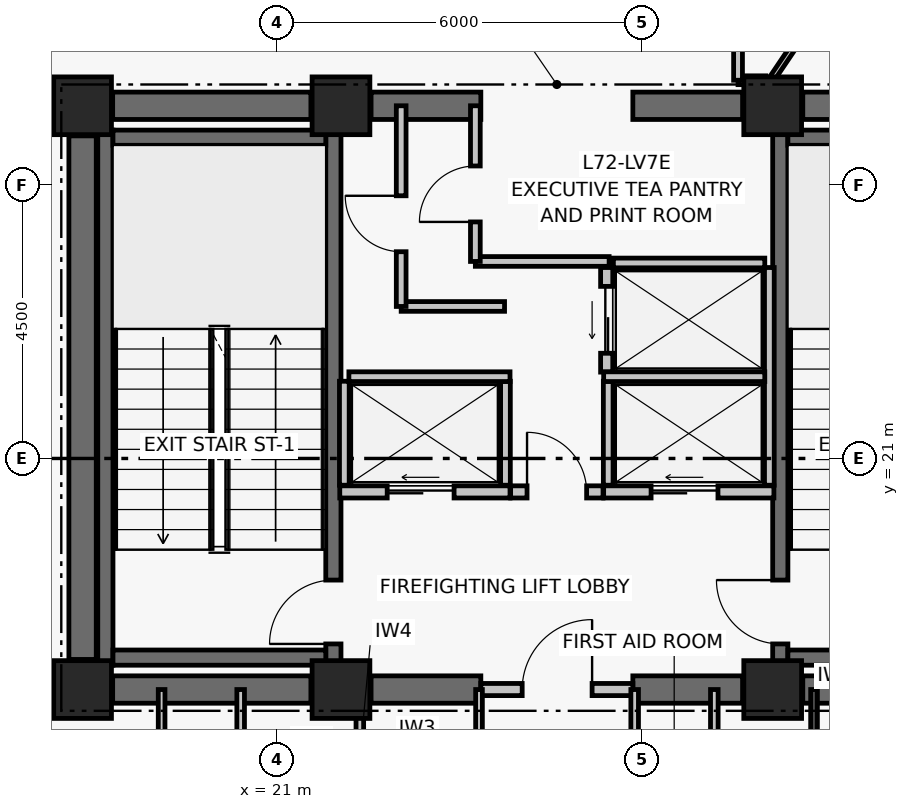
"""IFC4 building model, lengths in metres.
Left out: names, types, materials, properties, quantities, classifications, styles, units other than length and angle.
Written with IfcOpenShell. Run it as: python <this file> out.ifc"""

import sys

from ifc_helpers import new_model, si_unit, direction, frame, frame_2d, origin, origin_2d, place, context, subcontext, project, spatial, rectangle, extrude, element, fill, save


model = new_model("IFC4")
c1 = context("Model", 3, precision=1e-05, world=origin(), true_north=direction((0.0, 1.0)))
c2 = subcontext(c1, "Body", "Model", "MODEL_VIEW")
j1 = project(units=[si_unit("LENGTHUNIT", "METRE"), si_unit("PLANEANGLEUNIT", "RADIAN")], contexts=[c1])
p1 = place(None, origin())
s1 = spatial("IfcSite", under=j1, at=p1, CompositionType="ELEMENT")
p2 = place(p1, origin())
s2 = spatial("IfcBuilding", under=s1, at=p2, CompositionType="ELEMENT")
p3 = place(p2, frame((0.0, 0.0, 284.34)))
s3 = spatial("IfcBuildingStorey", under=s2, at=p3, CompositionType="ELEMENT", Elevation=284.34)
for number, where, z_axis, x_axis in (
    (1, (17.8, 17.2, 0.0), (0.0, 0.0, 1.0), (1.0, 0.0, 0.0)),
    (2, (22.05, 17.2, 0.0), (0.0, 0.0, 1.0), (1.0, 0.0, 0.0)),
    (3, (29.15, 17.2, 0.0), (0.0, 0.0, 1.0), (1.0, 0.0, 0.0)),
    (4, (17.8, 26.8, 0.0), (0.0, 0.0, 1.0), (1.0, 0.0, 0.0)),
    (5, (22.05, 26.8, 0.0), (0.0, 0.0, 1.0), (1.0, 0.0, 0.0)),
    (6, (29.15, 26.8, 0.0), (0.0, 0.0, 1.0), (1.0, 0.0, 0.0)),
):
    element("IfcColumn", number, at=place(p3, frame(where, z_axis=z_axis, x_axis=x_axis)), inside=s3, PredefinedType="COLUMN", context=c2, shape_type="SweptSolid", body=[
        extrude(rectangle(XDim=0.95, YDim=0.95, at=origin_2d()), origin(), (0.0, 0.0, 1.0), 3.72),
    ])
p4 = place(p3, frame((18.295, 17.2, 0.0), z_axis=(0.0, 0.0, 1.0), x_axis=(1.0, 0.0, 0.0)))
e7 = element("IfcWall", 7, at=p4, inside=s3, PredefinedType="SHEAR", context=c2, shape_type="SweptSolid", body=[
    extrude(rectangle(XDim=3.26, YDim=0.45, at=frame_2d((1.63, 0.0))), origin(), (0.0, 0.0, 1.0), 3.5),
])
p5 = place(p3, frame((22.545, 17.2, 0.0), z_axis=(0.0, 0.0, 1.0), x_axis=(1.0, 0.0, 0.0)))
e8 = element("IfcWall", 8, at=p5, inside=s3, PredefinedType="SHEAR", context=c2, shape_type="SweptSolid", body=[
    extrude(rectangle(XDim=1.805, YDim=0.45, at=frame_2d((0.903, 0.0))), origin(), (0.0, 0.0, 1.0), 3.5),
])
p6 = place(p3, frame((26.85, 17.2, 0.0), z_axis=(0.0, 0.0, 1.0), x_axis=(1.0, 0.0, 0.0)))
e9 = element("IfcWall", 9, at=p6, inside=s3, PredefinedType="SHEAR", context=c2, shape_type="SweptSolid", body=[
    extrude(rectangle(XDim=1.805, YDim=0.45, at=frame_2d((0.902, 0.0))), origin(), (0.0, 0.0, 1.0), 3.5),
])
for number, where, z_axis, x_axis in (
    (10, (29.645, 17.2, 0.0), (0.0, 0.0, 1.0), (1.0, 0.0, 0.0)),
    (11, (18.295, 26.8, 0.0), (0.0, 0.0, 1.0), (1.0, 0.0, 0.0)),
):
    element("IfcWall", number, at=place(p3, frame(where, z_axis=z_axis, x_axis=x_axis)), inside=s3, PredefinedType="SHEAR", context=c2, shape_type="SweptSolid", body=[
        extrude(rectangle(XDim=3.26, YDim=0.45, at=frame_2d((1.63, 0.0))), origin(), (0.0, 0.0, 1.0), 3.5),
    ])
p7 = place(p3, frame((22.545, 26.8, 0.0), z_axis=(0.0, 0.0, 1.0), x_axis=(1.0, 0.0, 0.0)))
e12 = element("IfcWall", 12, at=p7, inside=s3, PredefinedType="SHEAR", context=c2, shape_type="SweptSolid", body=[
    extrude(rectangle(XDim=1.805, YDim=0.45, at=frame_2d((0.903, 0.0))), origin(), (0.0, 0.0, 1.0), 3.5),
])
p8 = place(p3, frame((26.85, 26.8, 0.0), z_axis=(0.0, 0.0, 1.0), x_axis=(1.0, 0.0, 0.0)))
e13 = element("IfcWall", 13, at=p8, inside=s3, PredefinedType="SHEAR", context=c2, shape_type="SweptSolid", body=[
    extrude(rectangle(XDim=1.805, YDim=0.45, at=frame_2d((0.902, 0.0))), origin(), (0.0, 0.0, 1.0), 3.5),
])
p9 = place(p3, frame((29.645, 26.8, 0.0), z_axis=(0.0, 0.0, 1.0), x_axis=(1.0, 0.0, 0.0)))
e14 = element("IfcWall", 14, at=p9, inside=s3, PredefinedType="SHEAR", context=c2, shape_type="SweptSolid", body=[
    extrude(rectangle(XDim=3.26, YDim=0.45, at=frame_2d((1.63, 0.0))), origin(), (0.0, 0.0, 1.0), 3.5),
])
p10 = place(p3, frame((17.8, 17.695, 0.0), z_axis=(0.0, 0.0, 1.0), x_axis=(0.0, 1.0, 0.0)))
e15 = element("IfcWall", 15, at=p10, inside=s3, PredefinedType="SHEAR", context=c2, shape_type="SweptSolid", body=[
    extrude(rectangle(XDim=8.61, YDim=0.45, at=frame_2d((4.305, 0.0))), origin(), (0.0, 0.0, 1.0), 3.5),
])
p11 = place(p3, frame((18.175, 17.6, 0.0), z_axis=(0.0, 0.0, 1.0), x_axis=(0.0, 1.0, 0.0)))
e16 = element("IfcWall", 16, at=p11, inside=s3, PredefinedType="SHEAR", context=c2, shape_type="SweptSolid", body=[
    extrude(rectangle(XDim=8.8, YDim=0.25, at=frame_2d((4.4, 0.0))), origin(), (0.0, 0.0, 1.0), 3.5),
])
p12 = place(p3, frame((21.925, 17.6, 0.0), z_axis=(0.0, 0.0, 1.0), x_axis=(0.0, 1.0, 0.0)))
e17 = element("IfcWall", 17, at=p12, inside=s3, PredefinedType="SHEAR", context=c2, shape_type="SweptSolid", body=[
    extrude(rectangle(XDim=8.8, YDim=0.25, at=frame_2d((4.4, 0.0))), origin(), (0.0, 0.0, 1.0), 3.5),
])
p13 = place(p12, frame((0.35, 0.0, 0.0)))
e18 = element("IfcOpeningElement", 18, at=p13, cuts=e17, PredefinedType="OPENING", context=c2, shape_type="SweptSolid", body=[
    extrude(rectangle(XDim=1.05, YDim=2.08, at=frame_2d((0.525, 1.04))), frame((0.0, 0.135, 0.0), z_axis=(0.0, -1.0, 0.0), x_axis=(1.0, 0.0, 0.0)), (0.0, 0.0, 1.0), 0.27),
])
for number, where, z_axis, x_axis in (
    (19, (18.3, 17.725, 0.0), (0.0, 0.0, 1.0), (1.0, 0.0, 0.0)),
    (20, (18.3, 26.275, 0.0), (0.0, 0.0, 1.0), (1.0, 0.0, 0.0)),
):
    element("IfcWall", number, at=place(p3, frame(where, z_axis=z_axis, x_axis=x_axis)), inside=s3, PredefinedType="SHEAR", context=c2, shape_type="SweptSolid", body=[
        extrude(rectangle(XDim=3.5, YDim=0.25, at=frame_2d((1.75, 0.0))), origin(), (0.0, 0.0, 1.0), 3.5),
    ])
p14 = place(p3, frame((29.275, 17.6, 0.0), z_axis=(0.0, 0.0, 1.0), x_axis=(0.0, 1.0, 0.0)))
e21 = element("IfcWall", 21, at=p14, inside=s3, PredefinedType="SHEAR", context=c2, shape_type="SweptSolid", body=[
    extrude(rectangle(XDim=8.8, YDim=0.25, at=frame_2d((4.4, 0.0))), origin(), (0.0, 0.0, 1.0), 3.5),
])
p15 = place(p14, frame((0.35, 0.0, 0.0)))
e22 = element("IfcOpeningElement", 22, at=p15, cuts=e21, PredefinedType="OPENING", context=c2, shape_type="SweptSolid", body=[
    extrude(rectangle(XDim=1.05, YDim=2.08, at=frame_2d((0.525, 1.04))), frame((0.0, 0.135, 0.0), z_axis=(0.0, -1.0, 0.0), x_axis=(1.0, 0.0, 0.0)), (0.0, 0.0, 1.0), 0.27),
])
for number, where, z_axis, x_axis in (
    (23, (29.4, 17.725, 0.0), (0.0, 0.0, 1.0), (1.0, 0.0, 0.0)),
    (24, (29.4, 26.275, 0.0), (0.0, 0.0, 1.0), (1.0, 0.0, 0.0)),
):
    element("IfcWall", number, at=place(p3, frame(where, z_axis=z_axis, x_axis=x_axis)), inside=s3, PredefinedType="SHEAR", context=c2, shape_type="SweptSolid", body=[
        extrude(rectangle(XDim=3.5, YDim=0.25, at=frame_2d((1.75, 0.0))), origin(), (0.0, 0.0, 1.0), 3.5),
    ])
p16 = place(p3, frame((24.35, 17.2, 0.0), z_axis=(0.0, 0.0, 1.0), x_axis=(1.0, 0.0, 0.0)))
e25 = element("IfcWall", 25, at=p16, inside=s3, PredefinedType="PARTITIONING", context=c2, shape_type="SweptSolid", body=[
    extrude(rectangle(XDim=2.5, YDim=0.2, at=frame_2d((1.25, 0.0))), origin(), (0.0, 0.0, 1.0), 2.63),
])
p17 = place(p16, frame((0.68, 0.0, 0.0)))
e26 = element("IfcOpeningElement", 26, at=p17, cuts=e25, PredefinedType="OPENING", context=c2, shape_type="SweptSolid", body=[
    extrude(rectangle(XDim=1.15, YDim=2.08, at=frame_2d((0.575, 1.04))), frame((0.0, 0.11, 0.0), z_axis=(0.0, -1.0, 0.0), x_axis=(1.0, 0.0, 0.0)), (0.0, 0.0, 1.0), 0.22),
])
p18 = place(p3, frame((24.84, 20.45, 0.0), z_axis=(0.0, 0.0, 1.0), x_axis=(1.0, 0.0, 0.0)))
e27 = element("IfcWall", 27, at=p18, inside=s3, PredefinedType="PARTITIONING", context=c2, shape_type="SweptSolid", body=[
    extrude(rectangle(XDim=1.52, YDim=0.2, at=frame_2d((0.76, 0.0))), origin(), (0.0, 0.0, 1.0), 3.5),
])
p19 = place(p18, frame((0.27, 0.0, 0.0)))
e28 = element("IfcOpeningElement", 28, at=p19, cuts=e27, PredefinedType="OPENING", context=c2, shape_type="SweptSolid", body=[
    extrude(rectangle(XDim=0.98, YDim=2.06, at=frame_2d((0.49, 1.03))), frame((0.0, 0.11, 0.0), z_axis=(0.0, -1.0, 0.0), x_axis=(1.0, 0.0, 0.0)), (0.0, 0.0, 1.0), 0.22),
])
p20 = place(p3, frame((22.03, 20.45, 0.0), z_axis=(0.0, 0.0, 1.0), x_axis=(1.0, 0.0, 0.0)))
e29 = element("IfcWall", 29, at=p20, inside=s3, PredefinedType="PARTITIONING", context=c2, shape_type="SweptSolid", body=[
    extrude(rectangle(XDim=2.8, YDim=0.2, at=frame_2d((1.4, 0.0))), origin(), (0.0, 0.0, 1.0), 3.5),
])
p21 = place(p20, frame((0.78, 0.0, 0.0)))
e30 = element("IfcOpeningElement", 30, at=p21, cuts=e29, PredefinedType="OPENING", context=c2, shape_type="SweptSolid", body=[
    extrude(rectangle(XDim=1.1, YDim=2.08, at=frame_2d((0.55, 1.04))), frame((0.0, 0.11, 0.0), z_axis=(0.0, -1.0, 0.0), x_axis=(1.0, 0.0, 0.0)), (0.0, 0.0, 1.0), 0.22),
])
p22 = place(p3, frame((26.37, 20.45, 0.0), z_axis=(0.0, 0.0, 1.0), x_axis=(1.0, 0.0, 0.0)))
e31 = element("IfcWall", 31, at=p22, inside=s3, PredefinedType="PARTITIONING", context=c2, shape_type="SweptSolid", body=[
    extrude(rectangle(XDim=2.8, YDim=0.2, at=frame_2d((1.4, 0.0))), origin(), (0.0, 0.0, 1.0), 3.5),
])
p23 = place(p22, frame((0.78, 0.0, 0.0)))
e32 = element("IfcOpeningElement", 32, at=p23, cuts=e31, PredefinedType="OPENING", context=c2, shape_type="SweptSolid", body=[
    extrude(rectangle(XDim=1.1, YDim=2.08, at=frame_2d((0.55, 1.04))), frame((0.0, 0.11, 0.0), z_axis=(0.0, -1.0, 0.0), x_axis=(1.0, 0.0, 0.0)), (0.0, 0.0, 1.0), 0.22),
])
p24 = place(p3, frame((26.42, 22.42, 0.0), z_axis=(0.0, 0.0, 1.0), x_axis=(0.0, 1.0, 0.0)))
e33 = element("IfcWall", 33, at=p24, inside=s3, PredefinedType="PARTITIONING", context=c2, shape_type="SweptSolid", body=[
    extrude(rectangle(XDim=1.72, YDim=0.2, at=frame_2d((0.86, 0.0))), origin(), (0.0, 0.0, 1.0), 3.5),
])
p25 = place(p24, frame((0.31, 0.0, 0.0)))
e34 = element("IfcOpeningElement", 34, at=p25, cuts=e33, PredefinedType="OPENING", context=c2, shape_type="SweptSolid", body=[
    extrude(rectangle(XDim=1.1, YDim=2.08, at=frame_2d((0.55, 1.04))), frame((0.0, 0.11, 0.0), z_axis=(0.0, -1.0, 0.0), x_axis=(1.0, 0.0, 0.0)), (0.0, 0.0, 1.0), 0.22),
])
for number, where, z_axis, x_axis in (
    (35, (22.105, 20.56, 0.0), (0.0, 0.0, 1.0), (0.0, 1.0, 0.0)),
    (36, (24.755, 20.56, 0.0), (0.0, 0.0, 1.0), (0.0, 1.0, 0.0)),
):
    element("IfcWall", number, at=place(p3, frame(where, z_axis=z_axis, x_axis=x_axis)), inside=s3, PredefinedType="PARTITIONING", context=c2, shape_type="SweptSolid", body=[
        extrude(rectangle(XDim=1.71, YDim=0.16, at=frame_2d((0.855, 0.0))), origin(), (0.0, 0.0, 1.0), 3.5),
    ])
p26 = place(p3, frame((22.18, 22.345, 0.0), z_axis=(0.0, 0.0, 1.0), x_axis=(1.0, 0.0, 0.0)))
e37 = element("IfcWall", 37, at=p26, inside=s3, PredefinedType="PARTITIONING", context=c2, shape_type="SweptSolid", body=[
    extrude(rectangle(XDim=2.65, YDim=0.16, at=frame_2d((1.325, 0.0))), origin(), (0.0, 0.0, 1.0), 3.5),
])
p27 = place(p3, frame((29.095, 20.56, 0.0), z_axis=(0.0, 0.0, 1.0), x_axis=(0.0, 1.0, 0.0)))
e38 = element("IfcWall", 38, at=p27, inside=s3, PredefinedType="PARTITIONING", context=c2, shape_type="SweptSolid", body=[
    extrude(rectangle(XDim=3.58, YDim=0.16, at=frame_2d((1.79, 0.0))), origin(), (0.0, 0.0, 1.0), 3.5),
])
p28 = place(p3, frame((26.445, 20.56, 0.0), z_axis=(0.0, 0.0, 1.0), x_axis=(0.0, 1.0, 0.0)))
e39 = element("IfcWall", 39, at=p28, inside=s3, PredefinedType="PARTITIONING", context=c2, shape_type="SweptSolid", body=[
    extrude(rectangle(XDim=1.71, YDim=0.16, at=frame_2d((0.855, 0.0))), origin(), (0.0, 0.0, 1.0), 3.5),
])
p29 = place(p3, frame((26.37, 22.345, 0.0), z_axis=(0.0, 0.0, 1.0), x_axis=(1.0, 0.0, 0.0)))
e40 = element("IfcWall", 40, at=p29, inside=s3, PredefinedType="PARTITIONING", context=c2, shape_type="SweptSolid", body=[
    extrude(rectangle(XDim=2.65, YDim=0.16, at=frame_2d((1.325, 0.0))), origin(), (0.0, 0.0, 1.0), 3.5),
])
p30 = place(p3, frame((26.53, 24.215, 0.0), z_axis=(0.0, 0.0, 1.0), x_axis=(1.0, 0.0, 0.0)))
e41 = element("IfcWall", 41, at=p30, inside=s3, PredefinedType="PARTITIONING", context=c2, shape_type="SweptSolid", body=[
    extrude(rectangle(XDim=2.49, YDim=0.16, at=frame_2d((1.245, 0.0))), origin(), (0.0, 0.0, 1.0), 3.5),
])
p31 = place(p3, frame((23.04, 23.5, 0.0), z_axis=(0.0, 0.0, 1.0), x_axis=(1.0, 0.0, 0.0)))
e42 = element("IfcWall", 42, at=p31, inside=s3, PredefinedType="PARTITIONING", context=c2, shape_type="SweptSolid", body=[
    extrude(rectangle(XDim=1.7, YDim=0.16, at=frame_2d((0.85, 0.0))), origin(), (0.0, 0.0, 1.0), 3.5),
])
p32 = place(p3, frame((23.04, 23.5, 0.0), z_axis=(0.0, 0.0, 1.0), x_axis=(0.0, 1.0, 0.0)))
e43 = element("IfcWall", 43, at=p32, inside=s3, PredefinedType="PARTITIONING", context=c2, shape_type="SweptSolid", body=[
    extrude(rectangle(XDim=3.3, YDim=0.16, at=frame_2d((1.65, 0.0))), origin(), (0.0, 0.0, 1.0), 2.63),
])
p33 = place(p32, frame((0.9, 0.0, 0.0)))
e44 = element("IfcOpeningElement", 44, at=p33, cuts=e43, PredefinedType="OPENING", context=c2, shape_type="SweptSolid", body=[
    extrude(rectangle(XDim=0.92, YDim=2.05, at=frame_2d((0.46, 1.025))), frame((0.0, 0.09, 0.0), z_axis=(0.0, -1.0, 0.0), x_axis=(1.0, 0.0, 0.0)), (0.0, 0.0, 1.0), 0.18),
])
p34 = place(p3, frame((24.26, 24.24, 0.0), z_axis=(0.0, 0.0, 1.0), x_axis=(1.0, 0.0, 0.0)))
e45 = element("IfcWall", 45, at=p34, inside=s3, PredefinedType="PARTITIONING", context=c2, shape_type="SweptSolid", body=[
    extrude(rectangle(XDim=2.2, YDim=0.16, at=frame_2d((1.1, 0.0))), origin(), (0.0, 0.0, 1.0), 3.5),
])
p35 = place(p3, frame((24.26, 24.24, 0.0), z_axis=(0.0, 0.0, 1.0), x_axis=(0.0, 1.0, 0.0)))
e46 = element("IfcWall", 46, at=p35, inside=s3, PredefinedType="PARTITIONING", context=c2, shape_type="SweptSolid", body=[
    extrude(rectangle(XDim=2.56, YDim=0.16, at=frame_2d((1.28, 0.0))), origin(), (0.0, 0.0, 1.0), 2.63),
])
p36 = place(p35, frame((0.65, 0.0, 0.0)))
e47 = element("IfcOpeningElement", 47, at=p36, cuts=e46, PredefinedType="OPENING", context=c2, shape_type="SweptSolid", body=[
    extrude(rectangle(XDim=0.92, YDim=2.05, at=frame_2d((0.46, 1.025))), frame((0.0, 0.09, 0.0), z_axis=(0.0, -1.0, 0.0), x_axis=(1.0, 0.0, 0.0)), (0.0, 0.0, 1.0), 0.18),
])
p37 = place(p3, frame((19.1, 14.95, 0.0), z_axis=(0.0, 0.0, 1.0), x_axis=(0.0, 1.0, 0.0)))
e48 = element("IfcWall", 48, at=p37, inside=s3, PredefinedType="PARTITIONING", context=c2, shape_type="SweptSolid", body=[
    extrude(rectangle(XDim=2.25, YDim=0.11, at=frame_2d((1.125, 0.0))), origin(), (0.0, 0.0, 1.0), 2.63),
])
for number, where, z_axis, x_axis in (
    (49, (20.4, 14.95, 0.0), (0.0, 0.0, 1.0), (0.0, 1.0, 0.0)),
    (50, (22.36, 14.95, 0.0), (0.0, 0.0, 1.0), (0.0, 1.0, 0.0)),
):
    element("IfcWall", number, at=place(p3, frame(where, z_axis=z_axis, x_axis=x_axis)), inside=s3, PredefinedType="PARTITIONING", context=c2, shape_type="SweptSolid", body=[
        extrude(rectangle(XDim=2.25, YDim=0.125, at=frame_2d((1.125, 0.0))), origin(), (0.0, 0.0, 1.0), 2.63),
    ])
p38 = place(p3, frame((24.32, 14.95, 0.0), z_axis=(0.0, 0.0, 1.0), x_axis=(0.0, 1.0, 0.0)))
e51 = element("IfcWall", 51, at=p38, inside=s3, PredefinedType="PARTITIONING", context=c2, shape_type="SweptSolid", body=[
    extrude(rectangle(XDim=2.25, YDim=0.11, at=frame_2d((1.125, 0.0))), origin(), (0.0, 0.0, 1.0), 2.63),
])
for number, where, z_axis, x_axis in (
    (52, (26.88, 14.95, 0.0), (0.0, 0.0, 1.0), (0.0, 1.0, 0.0)),
    (53, (28.19, 14.95, 0.0), (0.0, 0.0, 1.0), (0.0, 1.0, 0.0)),
):
    element("IfcWall", number, at=place(p3, frame(where, z_axis=z_axis, x_axis=x_axis)), inside=s3, PredefinedType="PARTITIONING", context=c2, shape_type="SweptSolid", body=[
        extrude(rectangle(XDim=2.25, YDim=0.125, at=frame_2d((1.125, 0.0))), origin(), (0.0, 0.0, 1.0), 2.63),
    ])
p39 = place(p3, frame((29.83, 14.95, 0.0), z_axis=(0.0, 0.0, 1.0), x_axis=(0.0, 1.0, 0.0)))
e54 = element("IfcWall", 54, at=p39, inside=s3, PredefinedType="PARTITIONING", context=c2, shape_type="SweptSolid", body=[
    extrude(rectangle(XDim=2.25, YDim=0.11, at=frame_2d((1.125, 0.0))), origin(), (0.0, 0.0, 1.0), 2.63),
])
p40 = place(p3, frame((29.037, 27.22, 0.0), z_axis=(0.0, 0.0, 1.0), x_axis=(-1.0, 0.0, 0.0)))
e55 = element("IfcWall", 55, at=p40, inside=s3, PredefinedType="PARTITIONING", context=c2, shape_type="SweptSolid", body=[
    extrude(rectangle(XDim=0.457, YDim=0.145, at=frame_2d((0.228, 0.0))), origin(), (0.0, 0.0, 1.0), 2.63),
])
p41 = place(p3, frame((28.58, 27.22, 0.0), z_axis=(0.0, 0.0, 1.0), x_axis=(0.0, 1.0, 0.0)))
e56 = element("IfcWall", 56, at=p41, inside=s3, PredefinedType="PARTITIONING", context=c2, shape_type="SweptSolid", body=[
    extrude(rectangle(XDim=1.48, YDim=0.145, at=frame_2d((0.74, 0.0))), origin(), (0.0, 0.0, 1.0), 2.63),
])
p42 = place(p3, frame((29.087, 27.17, 0.0), z_axis=(0.0, 0.0, 1.0), x_axis=(0.559194012427, 0.829036824554, 0.0)))
e57 = element("IfcWall", 57, at=p42, inside=s3, PredefinedType="PARTITIONING", context=c2, shape_type="SweptSolid", body=[
    extrude(rectangle(XDim=3.504, YDim=0.095, at=frame_2d((1.752, 0.0))), origin(), (0.0, 0.0, 1.0), 2.63),
])
p43 = place(p13, origin())
e58 = element("IfcDoor", 58, at=p43, inside=s3, OperationType="SINGLE_SWING_LEFT", PredefinedType="DOOR", context=c2, shape_type="SweptSolid", body=[
    extrude(rectangle(XDim=1.05, YDim=2.08, at=frame_2d((0.525, 1.04))), frame((0.0, 0.025, 0.0), z_axis=(0.0, -1.0, 0.0), x_axis=(1.0, 0.0, 0.0)), (0.0, 0.0, 1.0), 0.05),
])
fill(e18, e58)
p44 = place(p15, origin())
e59 = element("IfcDoor", 59, at=p44, inside=s3, OperationType="SINGLE_SWING_RIGHT", PredefinedType="DOOR", context=c2, shape_type="SweptSolid", body=[
    extrude(rectangle(XDim=1.05, YDim=2.08, at=frame_2d((0.525, 1.04))), frame((0.0, 0.025, 0.0), z_axis=(0.0, -1.0, 0.0), x_axis=(1.0, 0.0, 0.0)), (0.0, 0.0, 1.0), 0.05),
])
fill(e22, e59)
p45 = place(p17, origin())
e60 = element("IfcDoor", 60, at=p45, inside=s3, OperationType="SINGLE_SWING_RIGHT", PredefinedType="DOOR", context=c2, shape_type="SweptSolid", body=[
    extrude(rectangle(XDim=1.15, YDim=2.08, at=frame_2d((0.575, 1.04))), frame((0.0, 0.025, 0.0), z_axis=(0.0, -1.0, 0.0), x_axis=(1.0, 0.0, 0.0)), (0.0, 0.0, 1.0), 0.05),
])
fill(e26, e60)
p46 = place(p19, origin())
e61 = element("IfcDoor", 61, at=p46, inside=s3, OperationType="SINGLE_SWING_LEFT", PredefinedType="DOOR", context=c2, shape_type="SweptSolid", body=[
    extrude(rectangle(XDim=0.98, YDim=2.06, at=frame_2d((0.49, 1.03))), frame((0.0, 0.025, 0.0), z_axis=(0.0, -1.0, 0.0), x_axis=(1.0, 0.0, 0.0)), (0.0, 0.0, 1.0), 0.05),
])
fill(e28, e61)
p47 = place(p21, origin())
e62 = element("IfcDoor", 62, at=p47, inside=s3, OperationType="DOUBLE_DOOR_SLIDING", PredefinedType="DOOR", context=c2, shape_type="SweptSolid", body=[
    extrude(rectangle(XDim=1.1, YDim=2.08, at=frame_2d((0.55, 1.04))), frame((0.0, 0.025, 0.0), z_axis=(0.0, -1.0, 0.0), x_axis=(1.0, 0.0, 0.0)), (0.0, 0.0, 1.0), 0.05),
])
fill(e30, e62)
p48 = place(p23, origin())
e63 = element("IfcDoor", 63, at=p48, inside=s3, OperationType="DOUBLE_DOOR_SLIDING", PredefinedType="DOOR", context=c2, shape_type="SweptSolid", body=[
    extrude(rectangle(XDim=1.1, YDim=2.08, at=frame_2d((0.55, 1.04))), frame((0.0, 0.025, 0.0), z_axis=(0.0, -1.0, 0.0), x_axis=(1.0, 0.0, 0.0)), (0.0, 0.0, 1.0), 0.05),
])
fill(e32, e63)
p49 = place(p25, origin())
e64 = element("IfcDoor", 64, at=p49, inside=s3, OperationType="DOUBLE_DOOR_SLIDING", PredefinedType="DOOR", context=c2, shape_type="SweptSolid", body=[
    extrude(rectangle(XDim=1.1, YDim=2.08, at=frame_2d((0.55, 1.04))), frame((0.0, 0.025, 0.0), z_axis=(0.0, -1.0, 0.0), x_axis=(1.0, 0.0, 0.0)), (0.0, 0.0, 1.0), 0.05),
])
fill(e34, e64)
p50 = place(p33, origin())
e65 = element("IfcDoor", 65, at=p50, inside=s3, OperationType="SINGLE_SWING_RIGHT", PredefinedType="DOOR", context=c2, shape_type="SweptSolid", body=[
    extrude(rectangle(XDim=0.92, YDim=2.05, at=frame_2d((0.46, 1.025))), frame((0.0, 0.025, 0.0), z_axis=(0.0, -1.0, 0.0), x_axis=(1.0, 0.0, 0.0)), (0.0, 0.0, 1.0), 0.05),
])
fill(e44, e65)
p51 = place(p36, origin())
e66 = element("IfcDoor", 66, at=p51, inside=s3, OperationType="SINGLE_SWING_LEFT", PredefinedType="DOOR", context=c2, shape_type="SweptSolid", body=[
    extrude(rectangle(XDim=0.92, YDim=2.05, at=frame_2d((0.46, 1.025))), frame((0.0, 0.025, 0.0), z_axis=(0.0, -1.0, 0.0), x_axis=(1.0, 0.0, 0.0)), (0.0, 0.0, 1.0), 0.05),
])
fill(e47, e66)
save(model, sys.argv[1])
